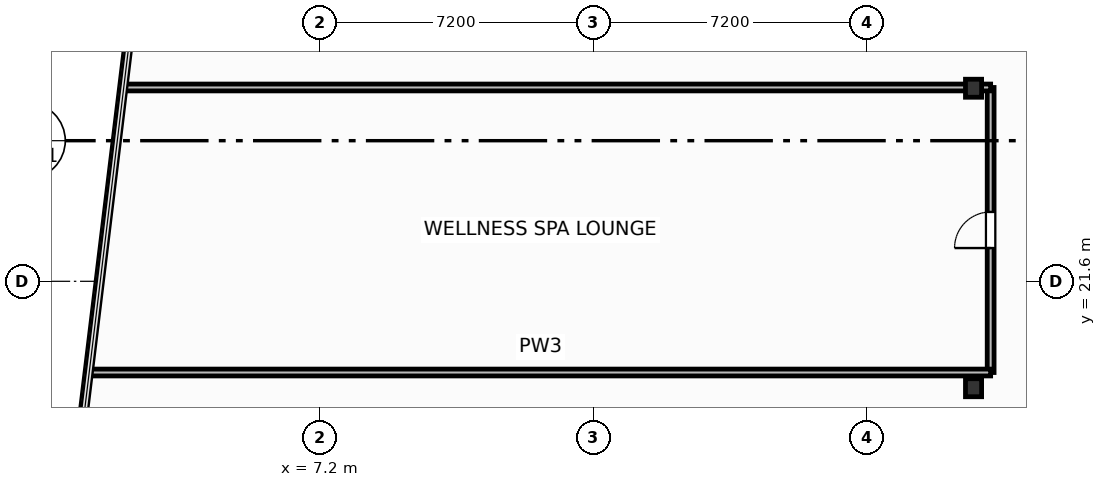
"""IFC4 building model, lengths in metres.
Left out: names, types, materials, properties, quantities, classifications, styles, units other than length and angle.
Written with IfcOpenShell. Run it as: python <this file> out.ifc"""

import sys

from ifc_helpers import new_model, si_unit, direction, frame, frame_2d, origin, origin_2d, place, context, subcontext, project, spatial, rectangle, i_section, extrude, element, fill, save


model = new_model("IFC4")
c1 = context("Model", 3, precision=1e-05, world=origin(), true_north=direction((0.0, 1.0)))
c2 = subcontext(c1, "Body", "Model", "MODEL_VIEW")
j1 = project(units=[si_unit("LENGTHUNIT", "METRE"), si_unit("PLANEANGLEUNIT", "RADIAN")], contexts=[c1])
p1 = place(None, origin())
s1 = spatial("IfcSite", under=j1, at=p1, CompositionType="ELEMENT")
p2 = place(p1, origin())
s2 = spatial("IfcBuilding", under=s1, at=p2, CompositionType="ELEMENT")
p3 = place(p2, frame((0.0, 0.0, 125.4)))
s3 = spatial("IfcBuildingStorey", under=s2, at=p3, CompositionType="ELEMENT", Elevation=125.4)
for number, where, z_axis, x_axis in (
    (1, (24.4, 18.8, 0.0), (0.0, 0.0, 1.0), (1.0, 0.0, 0.0)),
    (2, (24.4, 26.68, 0.0), (0.0, 0.0, 1.0), (1.0, 0.0, 0.0)),
):
    element("IfcColumn", number, at=place(p3, frame(where, z_axis=z_axis, x_axis=x_axis)), inside=s3, PredefinedType="COLUMN", context=c2, shape_type="SweptSolid", body=[
        extrude(i_section(OverallWidth=0.424, OverallDepth=0.474, WebThickness=0.048, FlangeThickness=0.077, FilletRadius=0.025, at=origin_2d()), origin(), (0.0, 0.0, 1.0), 3.7),
    ])
p4 = place(p3, frame((24.85, 19.2, 0.0), z_axis=(0.0, 0.0, 1.0), x_axis=(0.0, 1.0, 0.0)))
e3 = element("IfcWall", 3, at=p4, inside=s3, PredefinedType="PARTITIONING", context=c2, shape_type="SweptSolid", body=[
    extrude(rectangle(XDim=7.5, YDim=0.18, at=frame_2d((3.75, 0.0))), origin(), (0.0, 0.0, 1.0), 3.45),
])
p5 = place(p4, frame((3.275, 0.0, 0.0)))
e4 = element("IfcOpeningElement", 4, at=p5, cuts=e3, PredefinedType="OPENING", context=c2, shape_type="SweptSolid", body=[
    extrude(rectangle(XDim=0.95, YDim=2.05, at=frame_2d((0.475, 1.025))), frame((0.0, 0.1, 0.0), z_axis=(0.0, -1.0, 0.0), x_axis=(1.0, 0.0, 0.0)), (0.0, 0.0, 1.0), 0.2),
])
p6 = place(p3, frame((1.169, 19.2, 0.0), z_axis=(0.0, 0.0, 1.0), x_axis=(1.0, 0.0, 0.0)))
e5 = element("IfcWall", 5, at=p6, inside=s3, PredefinedType="PARTITIONING", context=c2, shape_type="SweptSolid", body=[
    extrude(rectangle(XDim=23.681, YDim=0.18, at=frame_2d((11.84, 0.0))), origin(), (0.0, 0.0, 1.0), 3.45),
])
p7 = place(p3, frame((2.078, 26.7, 0.0), z_axis=(0.0, 0.0, 1.0), x_axis=(1.0, 0.0, 0.0)))
e6 = element("IfcWall", 6, at=p7, inside=s3, PredefinedType="PARTITIONING", context=c2, shape_type="SweptSolid", body=[
    extrude(rectangle(XDim=22.772, YDim=0.18, at=frame_2d((11.386, 0.0))), origin(), (0.0, 0.0, 1.0), 2.662),
])
p8 = place(p5, origin())
e7 = element("IfcDoor", 7, at=p8, inside=s3, OperationType="SINGLE_SWING_LEFT", PredefinedType="DOOR", context=c2, shape_type="SweptSolid", body=[
    extrude(rectangle(XDim=0.95, YDim=2.05, at=frame_2d((0.475, 1.025))), frame((0.0, 0.025, 0.0), z_axis=(0.0, -1.0, 0.0), x_axis=(1.0, 0.0, 0.0)), (0.0, 0.0, 1.0), 0.05),
])
fill(e4, e7)
save(model, sys.argv[1])
